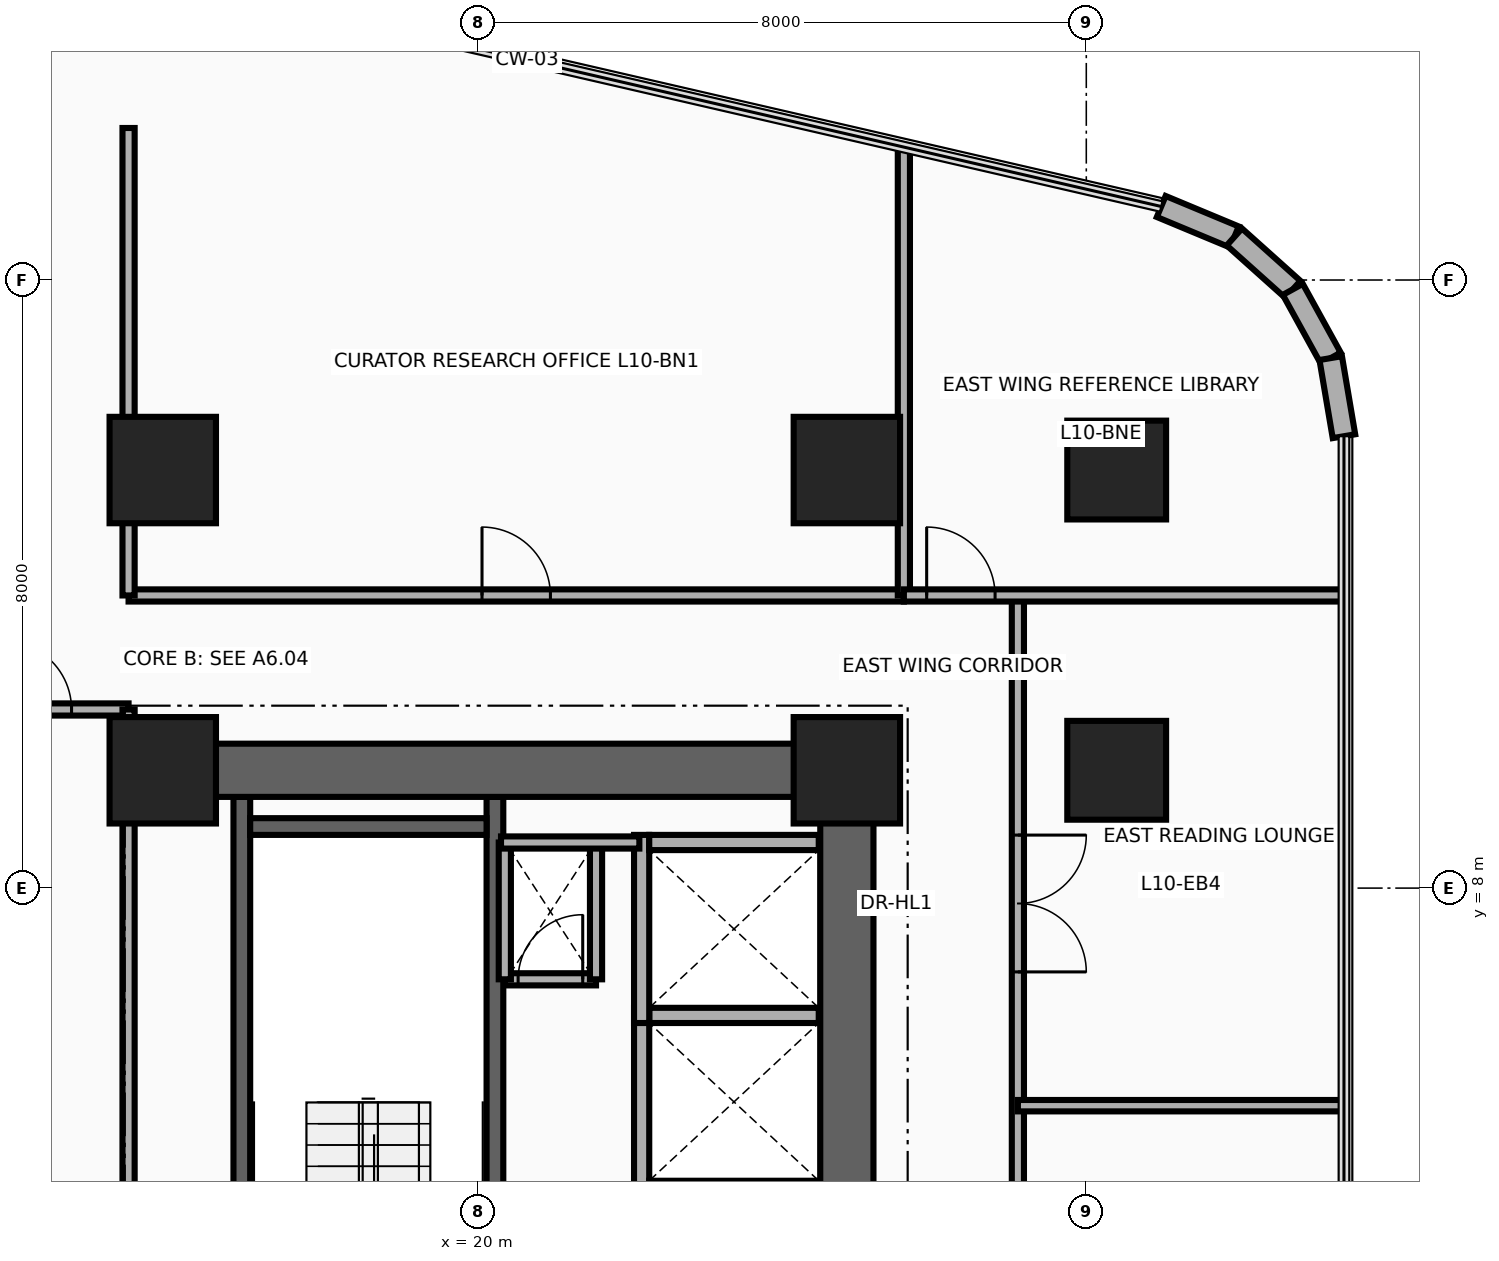
"""IFC4 building model, lengths in metres.
Left out: names, types, materials, properties, quantities, classifications, styles, units other than length and angle.
Written with IfcOpenShell. Run it as: python <this file> out.ifc"""

import sys

from ifc_helpers import new_model, si_unit, direction, frame, frame_2d, origin, origin_2d, place, context, subcontext, project, spatial, rectangle, circle, extrude, source, transform, mapped, element, fill, save


model = new_model("IFC4")
c1 = context("Model", 3, precision=1e-05, world=origin(), true_north=direction((0.0, 1.0)))
c2 = subcontext(c1, "Body", "Model", "MODEL_VIEW")
j1 = project(units=[si_unit("LENGTHUNIT", "METRE"), si_unit("PLANEANGLEUNIT", "RADIAN")], contexts=[c1])
p1 = place(None, origin())
s1 = spatial("IfcSite", under=j1, at=p1, CompositionType="ELEMENT")
p2 = place(p1, origin())
s2 = spatial("IfcBuilding", under=s1, at=p2, CompositionType="ELEMENT")
p3 = place(p2, frame((0.0, 0.0, 44.5)))
s3 = spatial("IfcBuildingStorey", under=s2, at=p3, CompositionType="ELEMENT", Elevation=44.5)
for number, where, z_axis, x_axis in (
    (1, (16.89, 0.68, 0.0), (0.0, 0.0, 1.0), (0.0, 1.0, 0.0)),
    (2, (20.22, 0.68, 0.0), (0.0, 0.0, 1.0), (0.0, 1.0, 0.0)),
):
    element("IfcWall", number, at=place(p3, frame(where, z_axis=z_axis, x_axis=x_axis)), inside=s3, PredefinedType="SHEAR", context=c2, shape_type="SweptSolid", body=[
        extrude(rectangle(XDim=8.52, YDim=0.22, at=frame_2d((4.26, 0.0))), origin(), (0.0, 0.0, 1.0), 3.46),
    ])
p4 = place(p3, frame((17.0, 8.81, 0.0), z_axis=(0.0, 0.0, 1.0), x_axis=(1.0, 0.0, 0.0)))
e3 = element("IfcWall", 3, at=p4, inside=s3, PredefinedType="SHEAR", context=c2, shape_type="SweptSolid", body=[
    extrude(rectangle(XDim=3.11, YDim=0.22, at=frame_2d((1.555, 0.0))), origin(), (0.0, 0.0, 1.0), 3.46),
])
p5 = place(p3, frame((24.85, 0.95, 0.0), z_axis=(0.0, 0.0, 1.0), x_axis=(0.0, 1.0, 0.0)))
e4 = element("IfcWall", 4, at=p5, inside=s3, PredefinedType="SHEAR", context=c2, shape_type="SweptSolid", body=[
    extrude(rectangle(XDim=8.95, YDim=0.7, at=frame_2d((4.475, 0.0))), origin(), (0.0, 0.0, 1.0), 3.46),
])
p6 = place(p3, frame((15.85, 9.55, 0.0), z_axis=(0.0, 0.0, 1.0), x_axis=(1.0, 0.0, 0.0)))
e5 = element("IfcWall", 5, at=p6, inside=s3, PredefinedType="SHEAR", context=c2, shape_type="SweptSolid", body=[
    extrude(rectangle(XDim=9.0, YDim=0.7, at=frame_2d((4.5, 0.0))), origin(), (0.0, 0.0, 1.0), 3.46),
])
m1 = source(origin(), c2, "Body", "SweptSolid", [
    extrude(rectangle(XDim=1.4, YDim=1.4, at=origin_2d()), origin(), (0.0, 0.0, 1.0), 3.7),
])
for number, where, z_axis, x_axis in (
    (6, (15.85, 9.55, 0.0), (0.0, 0.0, 1.0), (1.0, 0.0, 0.0)),
    (7, (24.85, 9.55, 0.0), (0.0, 0.0, 1.0), (1.0, 0.0, 0.0)),
):
    element("IfcColumn", number, at=place(p3, frame(where, z_axis=z_axis, x_axis=x_axis)), inside=s3, PredefinedType="COLUMN", context=c2, shape_type="MappedRepresentation", body=[
        mapped(m1, transform((0.0, 0.0, 0.0), x_axis=(1.0, 0.0, 0.0), y_axis=(0.0, 1.0, 0.0), z_axis=(0.0, 0.0, 1.0), scale=1.0)),
    ])
m2 = source(origin(), c2, "Body", "SweptSolid", [
    extrude(circle(Radius=0.65, at=origin_2d()), origin(), (0.0, 0.0, 1.0), 3.7),
])
p7 = place(p3, frame((28.4, 9.55, 0.0), z_axis=(0.0, 0.0, 1.0), x_axis=(1.0, 0.0, 0.0)))
e8 = element("IfcColumn", 8, at=p7, inside=s3, PredefinedType="COLUMN", context=c2, shape_type="MappedRepresentation", body=[
    mapped(m2, transform((0.0, 0.0, 0.0), x_axis=(1.0, 0.0, 0.0), y_axis=(0.0, 1.0, 0.0), z_axis=(0.0, 0.0, 1.0), scale=1.0)),
])
for number, where, z_axis, x_axis in (
    (9, (15.85, 13.5, 0.0), (0.0, 0.0, 1.0), (1.0, 0.0, 0.0)),
    (10, (24.85, 13.5, 0.0), (0.0, 0.0, 1.0), (1.0, 0.0, 0.0)),
):
    element("IfcColumn", number, at=place(p3, frame(where, z_axis=z_axis, x_axis=x_axis)), inside=s3, PredefinedType="COLUMN", context=c2, shape_type="MappedRepresentation", body=[
        mapped(m1, transform((0.0, 0.0, 0.0), x_axis=(1.0, 0.0, 0.0), y_axis=(0.0, 1.0, 0.0), z_axis=(0.0, 0.0, 1.0), scale=1.0)),
    ])
p8 = place(p3, frame((28.4, 13.5, 0.0), z_axis=(0.0, 0.0, 1.0), x_axis=(1.0, 0.0, 0.0)))
e11 = element("IfcColumn", 11, at=p8, inside=s3, PredefinedType="COLUMN", context=c2, shape_type="MappedRepresentation", body=[
    mapped(m2, transform((0.0, 0.0, 0.0), x_axis=(1.0, 0.0, 0.0), y_axis=(0.0, 1.0, 0.0), z_axis=(0.0, 0.0, 1.0), scale=1.0)),
])
p9 = place(p3, frame((28.986, 16.967, 0.0), z_axis=(0.0, 0.0, 1.0), x_axis=(0.923083852684, -0.384598753136, 0.0)))
e12 = element("IfcWall", 12, at=p9, inside=s3, PredefinedType="SOLIDWALL", context=c2, shape_type="SweptSolid", body=[
    extrude(rectangle(XDim=1.042, YDim=0.3, at=frame_2d((0.521, 0.0))), origin(), (0.0, 0.0, 1.0), 3.46),
])
p10 = place(p3, frame((29.948, 16.566, 0.0), z_axis=(0.0, 0.0, 1.0), x_axis=(0.744585645533, -0.66752694063, 0.0)))
e13 = element("IfcWall", 13, at=p10, inside=s3, PredefinedType="SOLIDWALL", context=c2, shape_type="SweptSolid", body=[
    extrude(rectangle(XDim=1.033, YDim=0.3, at=frame_2d((0.517, 0.0))), origin(), (0.0, 0.0, 1.0), 3.46),
])
p11 = place(p3, frame((30.717, 15.877, 0.0), z_axis=(0.0, 0.0, 1.0), x_axis=(0.482971098131, -0.875636293429, 0.0)))
e14 = element("IfcWall", 14, at=p11, inside=s3, PredefinedType="SOLIDWALL", context=c2, shape_type="SweptSolid", body=[
    extrude(rectangle(XDim=1.033, YDim=0.3, at=frame_2d((0.516, 0.0))), origin(), (0.0, 0.0, 1.0), 3.46),
])
p12 = place(p3, frame((31.216, 14.973, 0.0), z_axis=(0.0, 0.0, 1.0), x_axis=(0.167019462117, -0.985953598946, 0.0)))
e15 = element("IfcWall", 15, at=p12, inside=s3, PredefinedType="SOLIDWALL", context=c2, shape_type="SweptSolid", body=[
    extrude(rectangle(XDim=1.042, YDim=0.3, at=frame_2d((0.521, 0.0))), origin(), (0.0, 0.0, 1.0), 3.46),
])
p13 = place(p3, frame((22.15, 3.95, 0.0), z_axis=(0.0, 0.0, 1.0), x_axis=(0.0, 1.0, 0.0)))
e16 = element("IfcWall", 16, at=p13, inside=s3, PredefinedType="MOVABLE", context=c2, shape_type="SweptSolid", body=[
    extrude(rectangle(XDim=2.475, YDim=0.2, at=frame_2d((1.238, 0.0))), origin(), (0.0, 0.0, 1.0), 3.46),
])
for number, where, z_axis, x_axis in (
    (17, (22.25, 4.05, 0.0), (0.0, 0.0, 1.0), (1.0, 0.0, 0.0)),
    (18, (22.25, 6.325, 0.0), (0.0, 0.0, 1.0), (1.0, 0.0, 0.0)),
):
    element("IfcWall", number, at=place(p3, frame(where, z_axis=z_axis, x_axis=x_axis)), inside=s3, PredefinedType="MOVABLE", context=c2, shape_type="SweptSolid", body=[
        extrude(rectangle(XDim=2.23, YDim=0.2, at=frame_2d((1.115, 0.0))), origin(), (0.0, 0.0, 1.0), 2.245),
    ])
p14 = place(p3, frame((22.15, 6.225, 0.0), z_axis=(0.0, 0.0, 1.0), x_axis=(0.0, 1.0, 0.0)))
e19 = element("IfcWall", 19, at=p14, inside=s3, PredefinedType="MOVABLE", context=c2, shape_type="SweptSolid", body=[
    extrude(rectangle(XDim=2.475, YDim=0.2, at=frame_2d((1.237, 0.0))), origin(), (0.0, 0.0, 1.0), 3.46),
])
p15 = place(p3, frame((22.25, 8.6, 0.0), z_axis=(0.0, 0.0, 1.0), x_axis=(1.0, 0.0, 0.0)))
e20 = element("IfcWall", 20, at=p15, inside=s3, PredefinedType="MOVABLE", context=c2, shape_type="SweptSolid", body=[
    extrude(rectangle(XDim=2.23, YDim=0.2, at=frame_2d((1.115, 0.0))), origin(), (0.0, 0.0, 1.0), 2.245),
])
p16 = place(p3, frame((20.35, 6.8, 0.0), z_axis=(0.0, 0.0, 1.0), x_axis=(1.0, 0.0, 0.0)))
e21 = element("IfcWall", 21, at=p16, inside=s3, PredefinedType="PARTITIONING", context=c2, shape_type="SweptSolid", body=[
    extrude(rectangle(XDim=1.2, YDim=0.16, at=frame_2d((0.6, 0.0))), origin(), (0.0, 0.0, 1.0), 3.46),
])
p17 = place(p16, frame((0.175, 0.0, 0.0)))
e22 = element("IfcOpeningElement", 22, at=p17, cuts=e21, PredefinedType="OPENING", context=c2, shape_type="SweptSolid", body=[
    extrude(rectangle(XDim=0.85, YDim=2.05, at=frame_2d((0.425, 1.025))), frame((0.0, 0.095, 0.0), z_axis=(0.0, -1.0, 0.0), x_axis=(1.0, 0.0, 0.0)), (0.0, 0.0, 1.0), 0.19),
])
for number, where, z_axis, x_axis in (
    (23, (21.55, 6.8, 0.0), (0.0, 0.0, 1.0), (0.0, 1.0, 0.0)),
    (24, (20.35, 6.8, 0.0), (0.0, 0.0, 1.0), (0.0, 1.0, 0.0)),
):
    element("IfcWall", number, at=place(p3, frame(where, z_axis=z_axis, x_axis=x_axis)), inside=s3, PredefinedType="PARTITIONING", context=c2, shape_type="SweptSolid", body=[
        extrude(rectangle(XDim=1.8, YDim=0.16, at=frame_2d((0.9, 0.0))), origin(), (0.0, 0.0, 1.0), 3.46),
    ])
p18 = place(p3, frame((20.3, 8.6, 0.0), z_axis=(0.0, 0.0, 1.0), x_axis=(1.0, 0.0, 0.0)))
e25 = element("IfcWall", 25, at=p18, inside=s3, PredefinedType="PARTITIONING", context=c2, shape_type="SweptSolid", body=[
    extrude(rectangle(XDim=1.82, YDim=0.16, at=frame_2d((0.91, 0.0))), origin(), (0.0, 0.0, 1.0), 3.46),
])
p19 = place(p3, frame((15.4, 11.85, 0.0), z_axis=(0.0, 0.0, 1.0), x_axis=(1.0, 0.0, 0.0)))
e26 = element("IfcWall", 26, at=p19, inside=s3, PredefinedType="PARTITIONING", context=c2, shape_type="SweptSolid", body=[
    extrude(rectangle(XDim=10.2, YDim=0.16, at=frame_2d((5.1, 0.0))), origin(), (0.0, 0.0, 1.0), 2.834),
])
p20 = place(p19, frame((4.65, 0.0, 0.0)))
e27 = element("IfcOpeningElement", 27, at=p20, cuts=e26, PredefinedType="OPENING", context=c2, shape_type="SweptSolid", body=[
    extrude(rectangle(XDim=0.9, YDim=2.1, at=frame_2d((0.45, 1.05))), frame((0.0, 0.095, 0.0), z_axis=(0.0, -1.0, 0.0), x_axis=(1.0, 0.0, 0.0)), (0.0, 0.0, 1.0), 0.19),
])
p21 = place(p3, frame((15.4, 11.85, 0.0), z_axis=(0.0, 0.0, 1.0), x_axis=(0.0, 1.0, 0.0)))
e28 = element("IfcWall", 28, at=p21, inside=s3, PredefinedType="PARTITIONING", context=c2, shape_type="SweptSolid", body=[
    extrude(rectangle(XDim=6.15, YDim=0.16, at=frame_2d((3.075, 0.0))), origin(), (0.0, 0.0, 1.0), 2.583),
])
p22 = place(p3, frame((25.6, 11.85, 0.0), z_axis=(0.0, 0.0, 1.0), x_axis=(0.0, 1.0, 0.0)))
e29 = element("IfcWall", 29, at=p22, inside=s3, PredefinedType="PARTITIONING", context=c2, shape_type="SweptSolid", body=[
    extrude(rectangle(XDim=5.898, YDim=0.16, at=frame_2d((2.949, 0.0))), origin(), (0.0, 0.0, 1.0), 2.583),
])
p23 = place(p3, frame((27.1, -13.89, 0.0), z_axis=(0.0, 0.0, 1.0), x_axis=(0.0, 1.0, 0.0)))
e30 = element("IfcWall", 30, at=p23, inside=s3, PredefinedType="PARTITIONING", context=c2, shape_type="SweptSolid", body=[
    extrude(rectangle(XDim=25.74, YDim=0.16, at=frame_2d((12.87, 0.0))), origin(), (0.0, 0.0, 1.0), 2.583),
])
p24 = place(p23, frame((2.351, 0.0, 0.0)))
e31 = element("IfcOpeningElement", 31, at=p24, cuts=e30, PredefinedType="OPENING", context=c2, shape_type="SweptSolid", body=[
    extrude(rectangle(XDim=0.9, YDim=2.1, at=frame_2d((0.45, 1.05))), frame((0.0, 0.095, 0.0), z_axis=(0.0, -1.0, 0.0), x_axis=(1.0, 0.0, 0.0)), (0.0, 0.0, 1.0), 0.19),
])
p25 = place(p23, frame((8.059, 0.0, 0.0)))
e32 = element("IfcOpeningElement", 32, at=p25, cuts=e30, PredefinedType="OPENING", context=c2, shape_type="SweptSolid", body=[
    extrude(rectangle(XDim=1.8, YDim=2.15, at=frame_2d((0.9, 1.075))), frame((0.0, 0.095, 0.0), z_axis=(0.0, -1.0, 0.0), x_axis=(1.0, 0.0, 0.0)), (0.0, 0.0, 1.0), 0.19),
])
p26 = place(p23, frame((14.771, 0.0, 0.0)))
e33 = element("IfcOpeningElement", 33, at=p26, cuts=e30, PredefinedType="OPENING", context=c2, shape_type="SweptSolid", body=[
    extrude(rectangle(XDim=1.8, YDim=2.15, at=frame_2d((0.9, 1.075))), frame((0.0, 0.095, 0.0), z_axis=(0.0, -1.0, 0.0), x_axis=(1.0, 0.0, 0.0)), (0.0, 0.0, 1.0), 0.19),
])
p27 = place(p23, frame((20.788, 0.0, 0.0)))
e34 = element("IfcOpeningElement", 34, at=p27, cuts=e30, PredefinedType="OPENING", context=c2, shape_type="SweptSolid", body=[
    extrude(rectangle(XDim=1.8, YDim=2.15, at=frame_2d((0.9, 1.075))), frame((0.0, 0.095, 0.0), z_axis=(0.0, -1.0, 0.0), x_axis=(1.0, 0.0, 0.0)), (0.0, 0.0, 1.0), 0.19),
])
p28 = place(p3, frame((25.6, 11.85, 0.0), z_axis=(0.0, 0.0, 1.0), x_axis=(1.0, 0.0, 0.0)))
e35 = element("IfcWall", 35, at=p28, inside=s3, PredefinedType="PARTITIONING", context=c2, shape_type="SweptSolid", body=[
    extrude(rectangle(XDim=5.79, YDim=0.16, at=frame_2d((2.895, 0.0))), origin(), (0.0, 0.0, 1.0), 2.896),
])
p29 = place(p28, frame((0.3, 0.0, 0.0)))
e36 = element("IfcOpeningElement", 36, at=p29, cuts=e35, PredefinedType="OPENING", context=c2, shape_type="SweptSolid", body=[
    extrude(rectangle(XDim=0.9, YDim=2.1, at=frame_2d((0.45, 1.05))), frame((0.0, 0.095, 0.0), z_axis=(0.0, -1.0, 0.0), x_axis=(1.0, 0.0, 0.0)), (0.0, 0.0, 1.0), 0.19),
])
p30 = place(p3, frame((27.1, 5.137, 0.0), z_axis=(0.0, 0.0, 1.0), x_axis=(1.0, 0.0, 0.0)))
e37 = element("IfcWall", 37, at=p30, inside=s3, PredefinedType="PARTITIONING", context=c2, shape_type="SweptSolid", body=[
    extrude(rectangle(XDim=4.29, YDim=0.15, at=frame_2d((2.145, 0.0))), origin(), (0.0, 0.0, 1.0), 2.896),
])
p31 = place(p3, frame((13.3, 10.35, 0.0), z_axis=(0.0, 0.0, 1.0), x_axis=(1.0, 0.0, 0.0)))
e38 = element("IfcWall", 38, at=p31, inside=s3, PredefinedType="PARTITIONING", context=c2, shape_type="SweptSolid", body=[
    extrude(rectangle(XDim=2.1, YDim=0.16, at=frame_2d((1.05, 0.0))), origin(), (0.0, 0.0, 1.0), 2.583),
])
p32 = place(p31, frame((0.45, 0.0, 0.0)))
e39 = element("IfcOpeningElement", 39, at=p32, cuts=e38, PredefinedType="OPENING", context=c2, shape_type="SweptSolid", body=[
    extrude(rectangle(XDim=0.9, YDim=2.1, at=frame_2d((0.45, 1.05))), frame((0.0, 0.095, 0.0), z_axis=(0.0, -1.0, 0.0), x_axis=(1.0, 0.0, 0.0)), (0.0, 0.0, 1.0), 0.19),
])
p33 = place(p3, frame((15.4, 1.0, 0.0), z_axis=(0.0, 0.0, 1.0), x_axis=(0.0, 1.0, 0.0)))
e40 = element("IfcWall", 40, at=p33, inside=s3, PredefinedType="PARTITIONING", context=c2, shape_type="SweptSolid", body=[
    extrude(rectangle(XDim=9.35, YDim=0.16, at=frame_2d((4.675, 0.0))), origin(), (0.0, 0.0, 1.0), 2.245),
])
p34 = place(p17, origin())
e41 = element("IfcDoor", 41, at=p34, inside=s3, OperationType="SINGLE_SWING_LEFT", PredefinedType="DOOR", context=c2, shape_type="SweptSolid", body=[
    extrude(rectangle(XDim=0.85, YDim=2.05, at=frame_2d((0.425, 1.025))), frame((0.0, 0.025, 0.0), z_axis=(0.0, -1.0, 0.0), x_axis=(1.0, 0.0, 0.0)), (0.0, 0.0, 1.0), 0.05),
])
fill(e22, e41)
p35 = place(p20, origin())
e42 = element("IfcDoor", 42, at=p35, inside=s3, OperationType="SINGLE_SWING_RIGHT", PredefinedType="DOOR", context=c2, shape_type="SweptSolid", body=[
    extrude(rectangle(XDim=0.9, YDim=2.1, at=frame_2d((0.45, 1.05))), frame((0.0, 0.025, 0.0), z_axis=(0.0, -1.0, 0.0), x_axis=(1.0, 0.0, 0.0)), (0.0, 0.0, 1.0), 0.05),
])
fill(e27, e42)
p36 = place(p29, origin())
e43 = element("IfcDoor", 43, at=p36, inside=s3, OperationType="SINGLE_SWING_LEFT", PredefinedType="DOOR", context=c2, shape_type="SweptSolid", body=[
    extrude(rectangle(XDim=0.9, YDim=2.1, at=frame_2d((0.45, 1.05))), frame((0.0, 0.025, 0.0), z_axis=(0.0, -1.0, 0.0), x_axis=(1.0, 0.0, 0.0)), (0.0, 0.0, 1.0), 0.05),
])
fill(e36, e43)
p37 = place(p27, frame((1.8, 0.0, 0.0), z_axis=(0.0, 0.0, 1.0), x_axis=(-1.0, 0.0, 0.0)))
e44 = element("IfcDoor", 44, at=p37, inside=s3, OperationType="DOUBLE_DOOR_SINGLE_SWING", PredefinedType="DOOR", context=c2, shape_type="SweptSolid", body=[
    extrude(rectangle(XDim=1.8, YDim=2.15, at=frame_2d((0.9, 1.075))), frame((0.0, 0.025, 0.0), z_axis=(0.0, -1.0, 0.0), x_axis=(1.0, 0.0, 0.0)), (0.0, 0.0, 1.0), 0.05),
])
fill(e34, e44)
p38 = place(p32, origin())
e45 = element("IfcDoor", 45, at=p38, inside=s3, OperationType="SINGLE_SWING_RIGHT", PredefinedType="DOOR", context=c2, shape_type="SweptSolid", body=[
    extrude(rectangle(XDim=0.9, YDim=2.1, at=frame_2d((0.45, 1.05))), frame((0.0, 0.025, 0.0), z_axis=(0.0, -1.0, 0.0), x_axis=(1.0, 0.0, 0.0)), (0.0, 0.0, 1.0), 0.05),
])
fill(e39, e45)
save(model, sys.argv[1])
